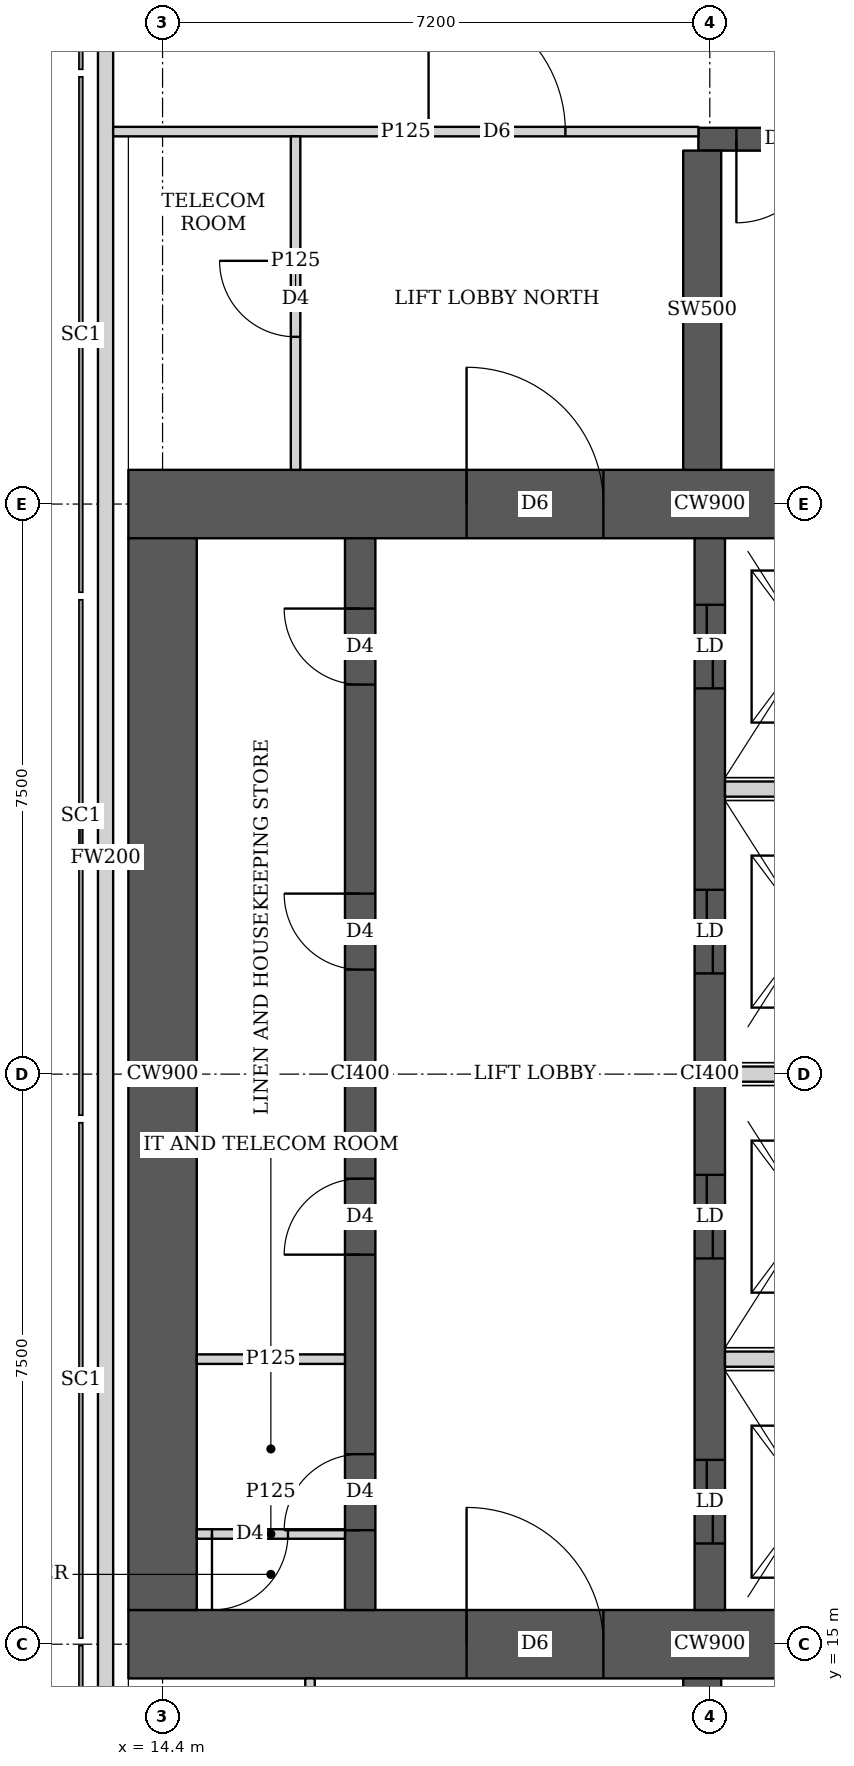
"""IFC4 building model, lengths in metres.
Left out: names, types, materials, properties, quantities, classifications, styles, units other than length and angle.
Written with IfcOpenShell. Run it as: python <this file> out.ifc"""

import sys

from ifc_helpers import new_model, si_unit, direction, frame, frame_2d, origin, place, context, subcontext, project, spatial, rectangle, extrude, element, fill, save


model = new_model("IFC4")
c1 = context("Model", 3, precision=1e-05, world=origin(), true_north=direction((0.0, 1.0)))
c2 = subcontext(c1, "Body", "Model", "MODEL_VIEW")
j1 = project(units=[si_unit("LENGTHUNIT", "METRE"), si_unit("PLANEANGLEUNIT", "RADIAN")], contexts=[c1])
p1 = place(None, origin())
s1 = spatial("IfcSite", under=j1, at=p1, CompositionType="ELEMENT")
p2 = place(p1, origin())
s2 = spatial("IfcBuilding", under=s1, at=p2, CompositionType="ELEMENT")
p3 = place(p2, frame((0.0, 0.0, 270.35)))
s3 = spatial("IfcBuildingStorey", under=s2, at=p3, CompositionType="ELEMENT", Elevation=270.35)
p4 = place(p3, frame((13.95, 15.0, 0.0), z_axis=(0.0, 0.0, 1.0), x_axis=(1.0, 0.0, 0.0)))
e1 = element("IfcWall", 1, at=p4, inside=s3, PredefinedType="SHEAR", context=c2, shape_type="SweptSolid", body=[
    extrude(rectangle(XDim=15.3, YDim=0.9, at=frame_2d((7.65, 0.0))), origin(), (0.0, 0.0, 1.0), 3.75),
])
p5 = place(p4, frame((4.45, 0.0, 0.0)))
e2 = element("IfcOpeningElement", 2, at=p5, cuts=e1, PredefinedType="OPENING", context=c2, shape_type="SweptSolid", body=[
    extrude(rectangle(XDim=1.8, YDim=2.1, at=frame_2d((0.9, 1.05))), frame((0.0, 0.46, 0.0), z_axis=(0.0, -1.0, 0.0), x_axis=(1.0, 0.0, 0.0)), (0.0, 0.0, 1.0), 0.92),
])
p6 = place(p4, frame((10.7, 0.0, 0.0)))
e3 = element("IfcOpeningElement", 3, at=p6, cuts=e1, PredefinedType="OPENING", context=c2, shape_type="SweptSolid", body=[
    extrude(rectangle(XDim=1.1, YDim=2.1, at=frame_2d((0.55, 1.05))), frame((0.0, 0.46, 0.0), z_axis=(0.0, -1.0, 0.0), x_axis=(1.0, 0.0, 0.0)), (0.0, 0.0, 1.0), 0.92),
])
p7 = place(p3, frame((13.95, 30.0, 0.0), z_axis=(0.0, 0.0, 1.0), x_axis=(1.0, 0.0, 0.0)))
e4 = element("IfcWall", 4, at=p7, inside=s3, PredefinedType="SHEAR", context=c2, shape_type="SweptSolid", body=[
    extrude(rectangle(XDim=15.3, YDim=0.9, at=frame_2d((7.65, 0.0))), origin(), (0.0, 0.0, 1.0), 3.75),
])
p8 = place(p7, frame((4.45, 0.0, 0.0)))
e5 = element("IfcOpeningElement", 5, at=p8, cuts=e4, PredefinedType="OPENING", context=c2, shape_type="SweptSolid", body=[
    extrude(rectangle(XDim=1.8, YDim=2.1, at=frame_2d((0.9, 1.05))), frame((0.0, 0.46, 0.0), z_axis=(0.0, -1.0, 0.0), x_axis=(1.0, 0.0, 0.0)), (0.0, 0.0, 1.0), 0.92),
])
p9 = place(p7, frame((10.7, 0.0, 0.0)))
e6 = element("IfcOpeningElement", 6, at=p9, cuts=e4, PredefinedType="OPENING", context=c2, shape_type="SweptSolid", body=[
    extrude(rectangle(XDim=1.1, YDim=2.1, at=frame_2d((0.55, 1.05))), frame((0.0, 0.46, 0.0), z_axis=(0.0, -1.0, 0.0), x_axis=(1.0, 0.0, 0.0)), (0.0, 0.0, 1.0), 0.92),
])
p10 = place(p3, frame((14.4, 15.45, 0.0), z_axis=(0.0, 0.0, 1.0), x_axis=(0.0, 1.0, 0.0)))
e7 = element("IfcWall", 7, at=p10, inside=s3, PredefinedType="SHEAR", context=c2, shape_type="SweptSolid", body=[
    extrude(rectangle(XDim=14.1, YDim=0.9, at=frame_2d((7.05, 0.0))), origin(), (0.0, 0.0, 1.0), 3.75),
])
p11 = place(p3, frame((17.0, 15.45, 0.0), z_axis=(0.0, 0.0, 1.0), x_axis=(0.0, 1.0, 0.0)))
e8 = element("IfcWall", 8, at=p11, inside=s3, PredefinedType="SHEAR", context=c2, shape_type="SweptSolid", body=[
    extrude(rectangle(XDim=14.1, YDim=0.4, at=frame_2d((7.05, 0.0))), origin(), (0.0, 0.0, 1.0), 3.75),
])
p12 = place(p11, frame((1.05, 0.0, 0.0)))
e9 = element("IfcOpeningElement", 9, at=p12, cuts=e8, PredefinedType="OPENING", context=c2, shape_type="SweptSolid", body=[
    extrude(rectangle(XDim=1.0, YDim=2.1, at=frame_2d((0.5, 1.05))), frame((0.0, 0.21, 0.0), z_axis=(0.0, -1.0, 0.0), x_axis=(1.0, 0.0, 0.0)), (0.0, 0.0, 1.0), 0.42),
])
p13 = place(p11, frame((4.675, 0.0, 0.0)))
e10 = element("IfcOpeningElement", 10, at=p13, cuts=e8, PredefinedType="OPENING", context=c2, shape_type="SweptSolid", body=[
    extrude(rectangle(XDim=1.0, YDim=2.1, at=frame_2d((0.5, 1.05))), frame((0.0, 0.21, 0.0), z_axis=(0.0, -1.0, 0.0), x_axis=(1.0, 0.0, 0.0)), (0.0, 0.0, 1.0), 0.42),
])
p14 = place(p11, frame((8.425, 0.0, 0.0)))
e11 = element("IfcOpeningElement", 11, at=p14, cuts=e8, PredefinedType="OPENING", context=c2, shape_type="SweptSolid", body=[
    extrude(rectangle(XDim=1.0, YDim=2.1, at=frame_2d((0.5, 1.05))), frame((0.0, 0.21, 0.0), z_axis=(0.0, -1.0, 0.0), x_axis=(1.0, 0.0, 0.0)), (0.0, 0.0, 1.0), 0.42),
])
p15 = place(p11, frame((12.175, 0.0, 0.0)))
e12 = element("IfcOpeningElement", 12, at=p15, cuts=e8, PredefinedType="OPENING", context=c2, shape_type="SweptSolid", body=[
    extrude(rectangle(XDim=1.0, YDim=2.1, at=frame_2d((0.5, 1.05))), frame((0.0, 0.21, 0.0), z_axis=(0.0, -1.0, 0.0), x_axis=(1.0, 0.0, 0.0)), (0.0, 0.0, 1.0), 0.42),
])
p16 = place(p3, frame((21.6, 15.45, 0.0), z_axis=(0.0, 0.0, 1.0), x_axis=(0.0, 1.0, 0.0)))
e13 = element("IfcWall", 13, at=p16, inside=s3, PredefinedType="SHEAR", context=c2, shape_type="SweptSolid", body=[
    extrude(rectangle(XDim=14.1, YDim=0.4, at=frame_2d((7.05, 0.0))), origin(), (0.0, 0.0, 1.0), 3.75),
])
p17 = place(p16, frame((0.875, 0.0, 0.0)))
e14 = element("IfcOpeningElement", 14, at=p17, cuts=e13, PredefinedType="OPENING", context=c2, shape_type="SweptSolid", body=[
    extrude(rectangle(XDim=1.1, YDim=2.1, at=frame_2d((0.55, 1.05))), frame((0.0, 0.21, 0.0), z_axis=(0.0, -1.0, 0.0), x_axis=(1.0, 0.0, 0.0)), (0.0, 0.0, 1.0), 0.42),
])
p18 = place(p16, frame((4.625, 0.0, 0.0)))
e15 = element("IfcOpeningElement", 15, at=p18, cuts=e13, PredefinedType="OPENING", context=c2, shape_type="SweptSolid", body=[
    extrude(rectangle(XDim=1.1, YDim=2.1, at=frame_2d((0.55, 1.05))), frame((0.0, 0.21, 0.0), z_axis=(0.0, -1.0, 0.0), x_axis=(1.0, 0.0, 0.0)), (0.0, 0.0, 1.0), 0.42),
])
p19 = place(p16, frame((8.375, 0.0, 0.0)))
e16 = element("IfcOpeningElement", 16, at=p19, cuts=e13, PredefinedType="OPENING", context=c2, shape_type="SweptSolid", body=[
    extrude(rectangle(XDim=1.1, YDim=2.1, at=frame_2d((0.55, 1.05))), frame((0.0, 0.21, 0.0), z_axis=(0.0, -1.0, 0.0), x_axis=(1.0, 0.0, 0.0)), (0.0, 0.0, 1.0), 0.42),
])
p20 = place(p16, frame((12.125, 0.0, 0.0)))
e17 = element("IfcOpeningElement", 17, at=p20, cuts=e13, PredefinedType="OPENING", context=c2, shape_type="SweptSolid", body=[
    extrude(rectangle(XDim=1.1, YDim=2.1, at=frame_2d((0.55, 1.05))), frame((0.0, 0.21, 0.0), z_axis=(0.0, -1.0, 0.0), x_axis=(1.0, 0.0, 0.0)), (0.0, 0.0, 1.0), 0.42),
])
p21 = place(p3, frame((21.5, 10.35, 0.0), z_axis=(0.0, 0.0, 1.0), x_axis=(0.0, 1.0, 0.0)))
e18 = element("IfcWall", 18, at=p21, inside=s3, PredefinedType="SHEAR", context=c2, shape_type="SweptSolid", body=[
    extrude(rectangle(XDim=4.2, YDim=0.5, at=frame_2d((2.1, 0.0))), origin(), (0.0, 0.0, 1.0), 3.75),
])
p22 = place(p3, frame((21.45, 34.8, 0.0), z_axis=(0.0, 0.0, 1.0), x_axis=(1.0, 0.0, 0.0)))
e19 = element("IfcWall", 19, at=p22, inside=s3, PredefinedType="SHEAR", context=c2, shape_type="SweptSolid", body=[
    extrude(rectangle(XDim=7.5, YDim=0.3, at=frame_2d((3.75, 0.0))), origin(), (0.0, 0.0, 1.0), 3.75),
])
p23 = place(p22, frame((0.5, 0.0, 0.0)))
e20 = element("IfcOpeningElement", 20, at=p23, cuts=e19, PredefinedType="OPENING", context=c2, shape_type="SweptSolid", body=[
    extrude(rectangle(XDim=1.1, YDim=2.1, at=frame_2d((0.55, 1.05))), frame((0.0, 0.16, 0.0), z_axis=(0.0, -1.0, 0.0), x_axis=(1.0, 0.0, 0.0)), (0.0, 0.0, 1.0), 0.32),
])
p24 = place(p3, frame((21.5, 30.45, 0.0), z_axis=(0.0, 0.0, 1.0), x_axis=(0.0, 1.0, 0.0)))
e21 = element("IfcWall", 21, at=p24, inside=s3, PredefinedType="SHEAR", context=c2, shape_type="SweptSolid", body=[
    extrude(rectangle(XDim=4.2, YDim=0.5, at=frame_2d((2.1, 0.0))), origin(), (0.0, 0.0, 1.0), 3.75),
])
p25 = place(p3, frame((13.65, 43.037, 0.0), z_axis=(0.0, 0.0, 1.0), x_axis=(0.0, -1.0, 0.0)))
e22 = element("IfcWall", 22, at=p25, inside=s3, PredefinedType="SOLIDWALL", context=c2, shape_type="SweptSolid", body=[
    extrude(rectangle(XDim=35.374, YDim=0.2, at=frame_2d((17.687, 0.0))), origin(), (0.0, 0.0, 1.0), 3.5),
])
p26 = place(p25, frame((1.959, 0.0, 0.9)))
e23 = element("IfcOpeningElement", 23, at=p26, cuts=e22, PredefinedType="OPENING", context=c2, shape_type="SweptSolid", body=[
    extrude(rectangle(XDim=1.8, YDim=1.5, at=frame_2d((0.9, 0.75))), frame((0.0, 0.11, 0.0), z_axis=(0.0, -1.0, 0.0), x_axis=(1.0, 0.0, 0.0)), (0.0, 0.0, 1.0), 0.22),
])
p27 = place(p3, frame((13.75, 34.9, 0.0), z_axis=(0.0, 0.0, 1.0), x_axis=(1.0, 0.0, 0.0)))
e24 = element("IfcWall", 24, at=p27, inside=s3, PredefinedType="PARTITIONING", context=c2, shape_type="SweptSolid", body=[
    extrude(rectangle(XDim=7.7, YDim=0.125, at=frame_2d((3.85, 0.0))), origin(), (0.0, 0.0, 1.0), 3.5),
])
p28 = place(p27, frame((4.15, 0.0, 0.0)))
e25 = element("IfcOpeningElement", 25, at=p28, cuts=e24, PredefinedType="OPENING", context=c2, shape_type="SweptSolid", body=[
    extrude(rectangle(XDim=1.8, YDim=2.1, at=frame_2d((0.9, 1.05))), frame((0.0, 0.073, 0.0), z_axis=(0.0, -1.0, 0.0), x_axis=(1.0, 0.0, 0.0)), (0.0, 0.0, 1.0), 0.145),
])
p29 = place(p3, frame((16.34, 10.562, 0.0), z_axis=(0.0, 0.0, 1.0), x_axis=(0.0, 1.0, 0.0)))
e26 = element("IfcWall", 26, at=p29, inside=s3, PredefinedType="PARTITIONING", context=c2, shape_type="SweptSolid", body=[
    extrude(rectangle(XDim=3.988, YDim=0.125, at=frame_2d((1.994, 0.0))), origin(), (0.0, 0.0, 1.0), 3.5),
])
p30 = place(p29, frame((1.438, 0.0, 0.0)))
e27 = element("IfcOpeningElement", 27, at=p30, cuts=e26, PredefinedType="OPENING", context=c2, shape_type="SweptSolid", body=[
    extrude(rectangle(XDim=1.0, YDim=2.1, at=frame_2d((0.5, 1.05))), frame((0.0, 0.073, 0.0), z_axis=(0.0, -1.0, 0.0), x_axis=(1.0, 0.0, 0.0)), (0.0, 0.0, 1.0), 0.145),
])
p31 = place(p3, frame((16.15, 30.45, 0.0), z_axis=(0.0, 0.0, 1.0), x_axis=(0.0, 1.0, 0.0)))
e28 = element("IfcWall", 28, at=p31, inside=s3, PredefinedType="PARTITIONING", context=c2, shape_type="SweptSolid", body=[
    extrude(rectangle(XDim=4.387, YDim=0.125, at=frame_2d((2.193, 0.0))), origin(), (0.0, 0.0, 1.0), 3.5),
])
p32 = place(p31, frame((1.75, 0.0, 0.0)))
e29 = element("IfcOpeningElement", 29, at=p32, cuts=e28, PredefinedType="OPENING", context=c2, shape_type="SweptSolid", body=[
    extrude(rectangle(XDim=1.0, YDim=2.1, at=frame_2d((0.5, 1.05))), frame((0.0, 0.073, 0.0), z_axis=(0.0, -1.0, 0.0), x_axis=(1.0, 0.0, 0.0)), (0.0, 0.0, 1.0), 0.145),
])
p33 = place(p3, frame((14.85, 16.45, 0.0), z_axis=(0.0, 0.0, 1.0), x_axis=(1.0, 0.0, 0.0)))
e30 = element("IfcWall", 30, at=p33, inside=s3, PredefinedType="PARTITIONING", context=c2, shape_type="SweptSolid", body=[
    extrude(rectangle(XDim=1.95, YDim=0.125, at=frame_2d((0.975, 0.0))), origin(), (0.0, 0.0, 1.0), 3.5),
])
p34 = place(p33, frame((0.2, 0.0, 0.0)))
e31 = element("IfcOpeningElement", 31, at=p34, cuts=e30, PredefinedType="OPENING", context=c2, shape_type="SweptSolid", body=[
    extrude(rectangle(XDim=1.0, YDim=2.1, at=frame_2d((0.5, 1.05))), frame((0.0, 0.073, 0.0), z_axis=(0.0, -1.0, 0.0), x_axis=(1.0, 0.0, 0.0)), (0.0, 0.0, 1.0), 0.145),
])
p35 = place(p3, frame((14.85, 18.75, 0.0), z_axis=(0.0, 0.0, 1.0), x_axis=(1.0, 0.0, 0.0)))
e32 = element("IfcWall", 32, at=p35, inside=s3, PredefinedType="PARTITIONING", context=c2, shape_type="SweptSolid", body=[
    extrude(rectangle(XDim=1.95, YDim=0.125, at=frame_2d((0.975, 0.0))), origin(), (0.0, 0.0, 1.0), 3.5),
])
for number, where, z_axis, x_axis in (
    (33, (21.8, 18.75, 0.0), (0.0, 0.0, 1.0), (1.0, 0.0, 0.0)),
    (34, (21.8, 22.5, 0.0), (0.0, 0.0, 1.0), (1.0, 0.0, 0.0)),
    (35, (21.8, 26.25, 0.0), (0.0, 0.0, 1.0), (1.0, 0.0, 0.0)),
):
    element("IfcWall", number, at=place(p3, frame(where, z_axis=z_axis, x_axis=x_axis)), inside=s3, PredefinedType="SOLIDWALL", context=c2, shape_type="SweptSolid", body=[
        extrude(rectangle(XDim=2.2, YDim=0.2, at=frame_2d((1.1, 0.0))), origin(), (0.0, 0.0, 1.0), 3.5),
    ])
p36 = place(p32, origin())
e36 = element("IfcDoor", 36, at=p36, inside=s3, OperationType="SINGLE_SWING_RIGHT", PredefinedType="DOOR", context=c2, shape_type="SweptSolid", body=[
    extrude(rectangle(XDim=1.0, YDim=2.1, at=frame_2d((0.5, 1.05))), frame((0.0, 0.025, 0.0), z_axis=(0.0, -1.0, 0.0), x_axis=(1.0, 0.0, 0.0)), (0.0, 0.0, 1.0), 0.05),
])
fill(e29, e36)
p37 = place(p28, origin())
e37 = element("IfcDoor", 37, at=p37, inside=s3, OperationType="DOUBLE_DOOR_SINGLE_SWING", PredefinedType="DOOR", context=c2, shape_type="SweptSolid", body=[
    extrude(rectangle(XDim=1.8, YDim=2.1, at=frame_2d((0.9, 1.05))), frame((0.0, 0.025, 0.0), z_axis=(0.0, -1.0, 0.0), x_axis=(1.0, 0.0, 0.0)), (0.0, 0.0, 1.0), 0.05),
])
fill(e25, e37)
p38 = place(p34, origin())
e38 = element("IfcDoor", 38, at=p38, inside=s3, OperationType="SINGLE_SWING_RIGHT", PredefinedType="DOOR", context=c2, shape_type="SweptSolid", body=[
    extrude(rectangle(XDim=1.0, YDim=2.1, at=frame_2d((0.5, 1.05))), frame((0.0, 0.025, 0.0), z_axis=(0.0, -1.0, 0.0), x_axis=(1.0, 0.0, 0.0)), (0.0, 0.0, 1.0), 0.05),
])
fill(e31, e38)
p39 = place(p12, origin())
e39 = element("IfcDoor", 39, at=p39, inside=s3, OperationType="SINGLE_SWING_LEFT", PredefinedType="DOOR", context=c2, shape_type="SweptSolid", body=[
    extrude(rectangle(XDim=1.0, YDim=2.1, at=frame_2d((0.5, 1.05))), frame((0.0, 0.025, 0.0), z_axis=(0.0, -1.0, 0.0), x_axis=(1.0, 0.0, 0.0)), (0.0, 0.0, 1.0), 0.05),
])
fill(e9, e39)
p40 = place(p13, origin())
e40 = element("IfcDoor", 40, at=p40, inside=s3, OperationType="SINGLE_SWING_LEFT", PredefinedType="DOOR", context=c2, shape_type="SweptSolid", body=[
    extrude(rectangle(XDim=1.0, YDim=2.1, at=frame_2d((0.5, 1.05))), frame((0.0, 0.025, 0.0), z_axis=(0.0, -1.0, 0.0), x_axis=(1.0, 0.0, 0.0)), (0.0, 0.0, 1.0), 0.05),
])
fill(e10, e40)
p41 = place(p14, origin())
e41 = element("IfcDoor", 41, at=p41, inside=s3, OperationType="SINGLE_SWING_RIGHT", PredefinedType="DOOR", context=c2, shape_type="SweptSolid", body=[
    extrude(rectangle(XDim=1.0, YDim=2.1, at=frame_2d((0.5, 1.05))), frame((0.0, 0.025, 0.0), z_axis=(0.0, -1.0, 0.0), x_axis=(1.0, 0.0, 0.0)), (0.0, 0.0, 1.0), 0.05),
])
fill(e11, e41)
p42 = place(p15, origin())
e42 = element("IfcDoor", 42, at=p42, inside=s3, OperationType="SINGLE_SWING_RIGHT", PredefinedType="DOOR", context=c2, shape_type="SweptSolid", body=[
    extrude(rectangle(XDim=1.0, YDim=2.1, at=frame_2d((0.5, 1.05))), frame((0.0, 0.025, 0.0), z_axis=(0.0, -1.0, 0.0), x_axis=(1.0, 0.0, 0.0)), (0.0, 0.0, 1.0), 0.05),
])
fill(e12, e42)
p43 = place(p5, origin())
e43 = element("IfcDoor", 43, at=p43, inside=s3, OperationType="DOUBLE_DOOR_SINGLE_SWING", PredefinedType="DOOR", context=c2, shape_type="SweptSolid", body=[
    extrude(rectangle(XDim=1.8, YDim=2.1, at=frame_2d((0.9, 1.05))), frame((0.0, 0.025, 0.0), z_axis=(0.0, -1.0, 0.0), x_axis=(1.0, 0.0, 0.0)), (0.0, 0.0, 1.0), 0.05),
])
fill(e2, e43)
p44 = place(p8, origin())
e44 = element("IfcDoor", 44, at=p44, inside=s3, OperationType="DOUBLE_DOOR_SINGLE_SWING", PredefinedType="DOOR", context=c2, shape_type="SweptSolid", body=[
    extrude(rectangle(XDim=1.8, YDim=2.1, at=frame_2d((0.9, 1.05))), frame((0.0, 0.025, 0.0), z_axis=(0.0, -1.0, 0.0), x_axis=(1.0, 0.0, 0.0)), (0.0, 0.0, 1.0), 0.05),
])
fill(e5, e44)
p45 = place(p17, origin())
e45 = element("IfcDoor", 45, at=p45, inside=s3, OperationType="DOUBLE_DOOR_SLIDING", PredefinedType="DOOR", context=c2, shape_type="SweptSolid", body=[
    extrude(rectangle(XDim=1.1, YDim=2.1, at=frame_2d((0.55, 1.05))), frame((0.0, 0.025, 0.0), z_axis=(0.0, -1.0, 0.0), x_axis=(1.0, 0.0, 0.0)), (0.0, 0.0, 1.0), 0.05),
])
fill(e14, e45)
p46 = place(p18, origin())
e46 = element("IfcDoor", 46, at=p46, inside=s3, OperationType="DOUBLE_DOOR_SLIDING", PredefinedType="DOOR", context=c2, shape_type="SweptSolid", body=[
    extrude(rectangle(XDim=1.1, YDim=2.1, at=frame_2d((0.55, 1.05))), frame((0.0, 0.025, 0.0), z_axis=(0.0, -1.0, 0.0), x_axis=(1.0, 0.0, 0.0)), (0.0, 0.0, 1.0), 0.05),
])
fill(e15, e46)
p47 = place(p19, origin())
e47 = element("IfcDoor", 47, at=p47, inside=s3, OperationType="DOUBLE_DOOR_SLIDING", PredefinedType="DOOR", context=c2, shape_type="SweptSolid", body=[
    extrude(rectangle(XDim=1.1, YDim=2.1, at=frame_2d((0.55, 1.05))), frame((0.0, 0.025, 0.0), z_axis=(0.0, -1.0, 0.0), x_axis=(1.0, 0.0, 0.0)), (0.0, 0.0, 1.0), 0.05),
])
fill(e16, e47)
p48 = place(p20, origin())
e48 = element("IfcDoor", 48, at=p48, inside=s3, OperationType="DOUBLE_DOOR_SLIDING", PredefinedType="DOOR", context=c2, shape_type="SweptSolid", body=[
    extrude(rectangle(XDim=1.1, YDim=2.1, at=frame_2d((0.55, 1.05))), frame((0.0, 0.025, 0.0), z_axis=(0.0, -1.0, 0.0), x_axis=(1.0, 0.0, 0.0)), (0.0, 0.0, 1.0), 0.05),
])
fill(e17, e48)
p49 = place(p23, origin())
e49 = element("IfcDoor", 49, at=p49, inside=s3, OperationType="SINGLE_SWING_RIGHT", PredefinedType="DOOR", context=c2, shape_type="SweptSolid", body=[
    extrude(rectangle(XDim=1.1, YDim=2.1, at=frame_2d((0.55, 1.05))), frame((0.0, 0.025, 0.0), z_axis=(0.0, -1.0, 0.0), x_axis=(1.0, 0.0, 0.0)), (0.0, 0.0, 1.0), 0.05),
])
fill(e20, e49)
save(model, sys.argv[1])
